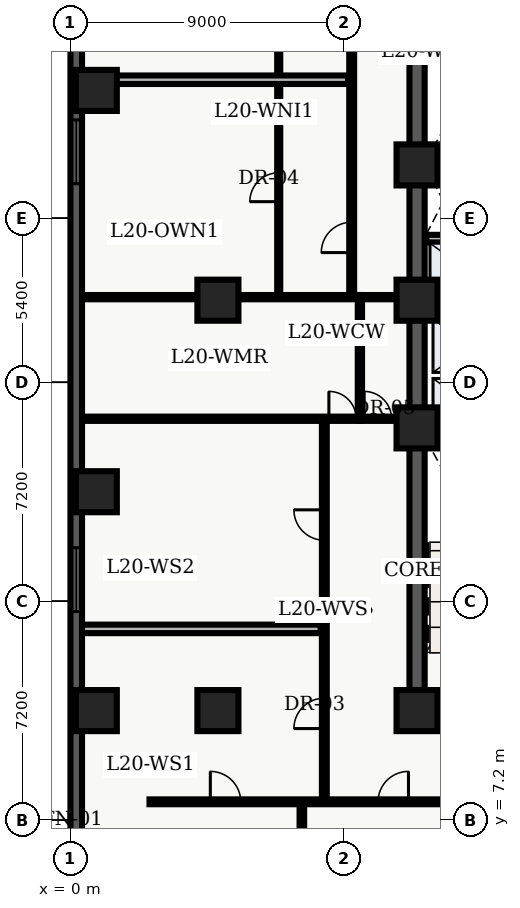
"""IFC4 building model, lengths in metres.
Left out: names, types, materials, properties, quantities, classifications, styles, units other than length and angle.
Written with IfcOpenShell. Run it as: python <this file> out.ifc"""

import sys

from ifc_helpers import new_model, entity, si_unit, converted_unit, direction, frame, origin_with_axes, origin_2d_with_axis, place, context, subcontext, project, spatial, polyline, rectangle, outline, extrude, element, fill, save


model = new_model("IFC4")
c1 = context("Model", 3, precision=1e-05, world=origin_with_axes(), true_north=direction((0.0, 1.0)))
c2 = subcontext(c1, "Body", "Model", "MODEL_VIEW")
j1 = project(units=[si_unit("LENGTHUNIT", "METRE"), converted_unit("PLANEANGLEUNIT", "DEGREE", entity("IfcPlaneAngleMeasure", 0.017), si_unit("PLANEANGLEUNIT", "RADIAN"), dimensions=[0, 0, 0, 0, 0, 0, 0])], contexts=[c1])
p1 = place(None, origin_with_axes())
s1 = spatial("IfcSite", under=j1, at=p1, CompositionType="ELEMENT")
p2 = place(p1, origin_with_axes())
s2 = spatial("IfcBuilding", under=s1, at=p2, CompositionType="ELEMENT")
p3 = place(p2, frame((0.0, 0.0, 84.6), z_axis=(0.0, 0.0, 1.0), x_axis=(1.0, 0.0, 0.0)))
s3 = spatial("IfcBuildingStorey", under=s2, at=p3, CompositionType="ELEMENT", Elevation=84.6)
p4 = place(p3, frame((11.4, 10.8, 0.0), z_axis=(0.0, 0.0, 1.0), x_axis=(0.0, 1.0, 0.0)))
e1 = element("IfcWall", 1, at=p4, inside=s3, PredefinedType="SHEAR", context=c2, shape_type="SweptSolid", body=[
    extrude(outline(polyline([(0.0, -0.25), (27.0, -0.25), (27.0, 0.25), (0.0, 0.25), (0.0, -0.25)])), origin_with_axes(), (0.0, 0.0, 1.0), 4.26),
])
p5 = place(p3, frame((11.4, 10.8, 0.0), z_axis=(0.0, 0.0, 1.0), x_axis=(1.0, 0.0, 0.0)))
e2 = element("IfcWall", 2, at=p5, inside=s3, PredefinedType="SHEAR", context=c2, shape_type="SweptSolid", body=[
    extrude(outline(polyline([(0.0, -0.25), (7.2, -0.25), (7.2, 0.25), (0.0, 0.25), (0.0, -0.25)])), origin_with_axes(), (0.0, 0.0, 1.0), 4.26),
])
p6 = place(p5, frame((2.625, 0.0, 0.0), z_axis=(0.0, 0.0, 1.0), x_axis=(1.0, 0.0, 0.0)))
e3 = element("IfcOpeningElement", 3, at=p6, cuts=e2, PredefinedType="OPENING", context=c2, shape_type="SweptSolid", body=[
    extrude(rectangle(XDim=1.05, YDim=0.52, at=origin_2d_with_axis()), origin_with_axes(), (0.0, 0.0, 1.0), 2.15),
])
for number, where, z_axis, x_axis in (
    (4, (11.65, 19.825, 0.0), (0.0, 0.0, 1.0), (1.0, 0.0, 0.0)),
    (5, (11.65, 28.775, 0.0), (0.0, 0.0, 1.0), (1.0, 0.0, 0.0)),
):
    element("IfcWall", number, at=place(p3, frame(where, z_axis=z_axis, x_axis=x_axis)), inside=s3, PredefinedType="SHEAR", context=c2, shape_type="SweptSolid", body=[
        extrude(outline(polyline([(0.0, -0.125), (6.7, -0.125), (6.7, 0.125), (0.0, 0.125), (0.0, -0.125)])), origin_with_axes(), (0.0, 0.0, 1.0), 4.26),
    ])
p7 = place(p3, frame((11.7, 24.1, 0.0), z_axis=(0.0, 0.0, 1.0), x_axis=(1.0, 0.0, 0.0)))
e6 = element("IfcWall", 6, at=p7, inside=s3, PredefinedType="SOLIDWALL", context=c2, shape_type="SweptSolid", body=[
    extrude(outline(polyline([(0.0, -0.125), (6.6, -0.125), (6.6, 0.125), (0.0, 0.125), (0.0, -0.125)])), origin_with_axes(), (0.0, 0.0, 1.0), 3.3),
])
p8 = place(p7, frame((3.75, 0.0, 0.0), z_axis=(0.0, 0.0, 1.0), x_axis=(1.0, 0.0, 0.0)))
e7 = element("IfcOpeningElement", 7, at=p8, cuts=e6, PredefinedType="OPENING", context=c2, shape_type="SweptSolid", body=[
    extrude(rectangle(XDim=0.9, YDim=0.27, at=origin_2d_with_axis()), origin_with_axes(), (0.0, 0.0, 1.0), 2.15),
])
p9 = place(p3, frame((11.7, 26.325, 0.0), z_axis=(0.0, 0.0, 1.0), x_axis=(1.0, 0.0, 0.0)))
e8 = element("IfcWall", 8, at=p9, inside=s3, PredefinedType="SOLIDWALL", context=c2, shape_type="SweptSolid", body=[
    extrude(outline(polyline([(0.0, -0.125), (6.6, -0.125), (6.6, 0.125), (0.0, 0.125), (0.0, -0.125)])), origin_with_axes(), (0.0, 0.0, 1.0), 3.3),
])
p10 = place(p9, frame((3.5, 0.0, 0.0), z_axis=(0.0, 0.0, 1.0), x_axis=(1.0, 0.0, 0.0)))
e9 = element("IfcOpeningElement", 9, at=p10, cuts=e8, PredefinedType="OPENING", context=c2, shape_type="SweptSolid", body=[
    extrude(rectangle(XDim=0.9, YDim=0.27, at=origin_2d_with_axis()), origin_with_axes(), (0.0, 0.0, 1.0), 2.15),
])
for number, where, z_axis, x_axis in (
    (10, (11.4, 10.8, 0.0), (0.0, 0.0, 1.0), (1.0, 0.0, 0.0)),
    (11, (11.4, 20.1, 0.0), (0.0, 0.0, 1.0), (1.0, 0.0, 0.0)),
    (12, (11.4, 24.3, 0.0), (0.0, 0.0, 1.0), (1.0, 0.0, 0.0)),
    (13, (11.4, 28.75, 0.0), (0.0, 0.0, 1.0), (1.0, 0.0, 0.0)),
    (14, (4.85, 10.8, 0.0), (0.0, 0.0, 1.0), (1.0, 0.0, 0.0)),
    (15, (4.85, 24.3, 0.0), (0.0, 0.0, 1.0), (1.0, 0.0, 0.0)),
    (16, (0.85, 10.8, 0.0), (0.0, 0.0, 1.0), (1.0, 0.0, 0.0)),
    (17, (0.85, 18.0, 0.0), (0.0, 0.0, 1.0), (1.0, 0.0, 0.0)),
    (18, (0.85, 31.2, 0.0), (0.0, 0.0, 1.0), (1.0, 0.0, 0.0)),
):
    element("IfcColumn", number, at=place(p3, frame(where, z_axis=z_axis, x_axis=x_axis)), inside=s3, PredefinedType="COLUMN", context=c2, shape_type="SweptSolid", body=[
        extrude(rectangle(XDim=1.35, YDim=1.35, at=origin_2d_with_axis()), origin_with_axes(), (0.0, 0.0, 1.0), 4.5),
    ])
p11 = place(p3, frame((9.52, 20.4, 0.0), z_axis=(0.0, 0.0, 1.0), x_axis=(0.0, 1.0, 0.0)))
e19 = element("IfcWall", 19, at=p11, inside=s3, PredefinedType="PARTITIONING", context=c2, shape_type="SweptSolid", body=[
    extrude(outline(polyline([(0.0, -0.07), (4.0, -0.07), (4.0, 0.07), (0.0, 0.07), (0.0, -0.07)])), origin_with_axes(), (0.0, 0.0, 1.0), 3.2),
])
p12 = place(p3, frame((9.52, 20.4, 0.0), z_axis=(0.0, 0.0, 1.0), x_axis=(1.0, 0.0, 0.0)))
e20 = element("IfcWall", 20, at=p12, inside=s3, PredefinedType="PARTITIONING", context=c2, shape_type="SweptSolid", body=[
    extrude(outline(polyline([(0.0, -0.07), (1.58, -0.07), (1.58, 0.07), (0.0, 0.07), (0.0, -0.07)])), origin_with_axes(), (0.0, 0.0, 1.0), 3.2),
])
p13 = place(p12, frame((0.59, 0.0, 0.0), z_axis=(0.0, 0.0, 1.0), x_axis=(1.0, 0.0, 0.0)))
e21 = element("IfcOpeningElement", 21, at=p13, cuts=e20, PredefinedType="OPENING", context=c2, shape_type="SweptSolid", body=[
    extrude(rectangle(XDim=0.9, YDim=0.16, at=origin_2d_with_axis()), origin_with_axes(), (0.0, 0.0, 1.0), 2.15),
])
p14 = place(p3, frame((9.52, 24.4, 0.0), z_axis=(0.0, 0.0, 1.0), x_axis=(1.0, 0.0, 0.0)))
e22 = element("IfcWall", 22, at=p14, inside=s3, PredefinedType="PARTITIONING", context=c2, shape_type="SweptSolid", body=[
    extrude(outline(polyline([(0.0, -0.07), (1.58, -0.07), (1.58, 0.07), (0.0, 0.07), (0.0, -0.07)])), origin_with_axes(), (0.0, 0.0, 1.0), 3.2),
])
p15 = place(p3, frame((2.6, 7.8, 0.0), z_axis=(0.0, 0.0, 1.0), x_axis=(1.0, 0.0, 0.0)))
e23 = element("IfcWall", 23, at=p15, inside=s3, PredefinedType="PARTITIONING", context=c2, shape_type="SweptSolid", body=[
    extrude(outline(polyline([(0.0, -0.08), (18.55, -0.08), (18.55, 0.08), (0.0, 0.08), (0.0, -0.08)])), origin_with_axes(), (0.0, 0.0, 1.0), 3.2),
])
p16 = place(p15, frame((2.501, 0.0, 0.0), z_axis=(0.0, 0.0, 1.0), x_axis=(1.0, 0.0, 0.0)))
e24 = element("IfcOpeningElement", 24, at=p16, cuts=e23, PredefinedType="OPENING", context=c2, shape_type="SweptSolid", body=[
    extrude(rectangle(XDim=1.0, YDim=0.18, at=origin_2d_with_axis()), origin_with_axes(), (0.0, 0.0, 1.0), 2.15),
])
p17 = place(p15, frame((8.018, 0.0, 0.0), z_axis=(0.0, 0.0, 1.0), x_axis=(1.0, 0.0, 0.0)))
e25 = element("IfcOpeningElement", 25, at=p17, cuts=e23, PredefinedType="OPENING", context=c2, shape_type="SweptSolid", body=[
    extrude(rectangle(XDim=1.0, YDim=0.18, at=origin_2d_with_axis()), origin_with_axes(), (0.0, 0.0, 1.0), 2.15),
])
p18 = place(p15, frame((14.762, 0.0, 0.0), z_axis=(0.0, 0.0, 1.0), x_axis=(1.0, 0.0, 0.0)))
e26 = element("IfcOpeningElement", 26, at=p18, cuts=e23, PredefinedType="OPENING", context=c2, shape_type="SweptSolid", body=[
    extrude(rectangle(XDim=1.2, YDim=0.18, at=origin_2d_with_axis()), origin_with_axes(), (0.0, 0.0, 1.0), 2.2),
])
p19 = place(p3, frame((8.35, 7.8, 0.0), z_axis=(0.0, 0.0, 1.0), x_axis=(0.0, 1.0, 0.0)))
e27 = element("IfcWall", 27, at=p19, inside=s3, PredefinedType="PARTITIONING", context=c2, shape_type="SweptSolid", body=[
    extrude(outline(polyline([(0.0, -0.08), (12.6, -0.08), (12.6, 0.08), (0.0, 0.08), (0.0, -0.08)])), origin_with_axes(), (0.0, 0.0, 1.0), 3.2),
])
p20 = place(p19, frame((2.909, 0.0, 0.0), z_axis=(0.0, 0.0, 1.0), x_axis=(1.0, 0.0, 0.0)))
e28 = element("IfcOpeningElement", 28, at=p20, cuts=e27, PredefinedType="OPENING", context=c2, shape_type="SweptSolid", body=[
    extrude(rectangle(XDim=1.0, YDim=0.18, at=origin_2d_with_axis()), origin_with_axes(), (0.0, 0.0, 1.0), 2.15),
])
p21 = place(p19, frame((9.104, 0.0, 0.0), z_axis=(0.0, 0.0, 1.0), x_axis=(1.0, 0.0, 0.0)))
e29 = element("IfcOpeningElement", 29, at=p21, cuts=e27, PredefinedType="OPENING", context=c2, shape_type="SweptSolid", body=[
    extrude(rectangle(XDim=1.0, YDim=0.18, at=origin_2d_with_axis()), origin_with_axes(), (0.0, 0.0, 1.0), 2.15),
])
p22 = place(p3, frame((9.25, 24.4, 0.0), z_axis=(0.0, 0.0, 1.0), x_axis=(0.0, 1.0, 0.0)))
e30 = element("IfcWall", 30, at=p22, inside=s3, PredefinedType="PARTITIONING", context=c2, shape_type="SweptSolid", body=[
    extrude(outline(polyline([(0.0, -0.08), (16.1, -0.08), (16.1, 0.08), (0.0, 0.08), (0.0, -0.08)])), origin_with_axes(), (0.0, 0.0, 1.0), 3.2),
])
p23 = place(p22, frame((1.966, 0.0, 0.0), z_axis=(0.0, 0.0, 1.0), x_axis=(1.0, 0.0, 0.0)))
e31 = element("IfcOpeningElement", 31, at=p23, cuts=e30, PredefinedType="OPENING", context=c2, shape_type="SweptSolid", body=[
    extrude(rectangle(XDim=1.0, YDim=0.18, at=origin_2d_with_axis()), origin_with_axes(), (0.0, 0.0, 1.0), 2.15),
])
p24 = place(p22, frame((11.001, 0.0, 0.0), z_axis=(0.0, 0.0, 1.0), x_axis=(1.0, 0.0, 0.0)))
e32 = element("IfcOpeningElement", 32, at=p24, cuts=e30, PredefinedType="OPENING", context=c2, shape_type="SweptSolid", body=[
    extrude(rectangle(XDim=1.0, YDim=0.18, at=origin_2d_with_axis()), origin_with_axes(), (0.0, 0.0, 1.0), 2.15),
])
p25 = place(p3, frame((0.36, 20.4, 0.0), z_axis=(0.0, 0.0, 1.0), x_axis=(1.0, 0.0, 0.0)))
e33 = element("IfcWall", 33, at=p25, inside=s3, PredefinedType="PARTITIONING", context=c2, shape_type="SweptSolid", body=[
    extrude(outline(polyline([(0.0, -0.07), (9.16, -0.07), (9.16, 0.07), (0.0, 0.07), (0.0, -0.07)])), origin_with_axes(), (0.0, 0.0, 1.0), 3.2),
])
p26 = place(p25, frame((8.59, 0.0, 0.0), z_axis=(0.0, 0.0, 1.0), x_axis=(1.0, 0.0, 0.0)))
e34 = element("IfcOpeningElement", 34, at=p26, cuts=e33, PredefinedType="OPENING", context=c2, shape_type="SweptSolid", body=[
    extrude(rectangle(XDim=0.9, YDim=0.16, at=origin_2d_with_axis()), origin_with_axes(), (0.0, 0.0, 1.0), 2.15),
])
p27 = place(p3, frame((0.36, 24.4, 0.0), z_axis=(0.0, 0.0, 1.0), x_axis=(1.0, 0.0, 0.0)))
e35 = element("IfcWall", 35, at=p27, inside=s3, PredefinedType="PARTITIONING", context=c2, shape_type="SweptSolid", body=[
    extrude(outline(polyline([(0.0, -0.07), (9.16, -0.07), (9.16, 0.07), (0.0, 0.07), (0.0, -0.07)])), origin_with_axes(), (0.0, 0.0, 1.0), 3.2),
])
p28 = place(p3, frame((0.375, 13.488, 0.0), z_axis=(0.0, 0.0, 1.0), x_axis=(1.0, 0.0, 0.0)))
e36 = element("IfcWall", 36, at=p28, inside=s3, PredefinedType="PARTITIONING", context=c2, shape_type="SweptSolid", body=[
    extrude(outline(polyline([(0.0, -0.14), (7.855, -0.14), (7.855, 0.14), (0.0, 0.14), (0.0, -0.14)])), origin_with_axes(), (0.0, 0.0, 1.0), 3.2),
])
p29 = place(p3, frame((6.85, 24.55, 0.0), z_axis=(0.0, 0.0, 1.0), x_axis=(0.0, 1.0, 0.0)))
e37 = element("IfcWall", 37, at=p29, inside=s3, PredefinedType="PARTITIONING", context=c2, shape_type="SweptSolid", body=[
    extrude(outline(polyline([(0.0, -0.05), (15.75, -0.05), (15.75, 0.05), (0.0, 0.05), (0.0, -0.05)])), origin_with_axes(), (0.0, 0.0, 1.0), 3.2),
])
p30 = place(p29, frame((3.466, 0.0, 0.0), z_axis=(0.0, 0.0, 1.0), x_axis=(1.0, 0.0, 0.0)))
e38 = element("IfcOpeningElement", 38, at=p30, cuts=e37, PredefinedType="OPENING", context=c2, shape_type="SweptSolid", body=[
    extrude(rectangle(XDim=0.95, YDim=0.12, at=origin_2d_with_axis()), origin_with_axes(), (0.0, 0.0, 1.0), 2.15),
])
p31 = place(p29, frame((10.851, 0.0, 0.0), z_axis=(0.0, 0.0, 1.0), x_axis=(1.0, 0.0, 0.0)))
e39 = element("IfcOpeningElement", 39, at=p31, cuts=e37, PredefinedType="OPENING", context=c2, shape_type="SweptSolid", body=[
    extrude(rectangle(XDim=0.95, YDim=0.12, at=origin_2d_with_axis()), origin_with_axes(), (0.0, 0.0, 1.0), 2.15),
])
p32 = place(p3, frame((0.375, 31.552, 0.0), z_axis=(0.0, 0.0, 1.0), x_axis=(1.0, 0.0, 0.0)))
e40 = element("IfcWall", 40, at=p32, inside=s3, PredefinedType="PARTITIONING", context=c2, shape_type="SweptSolid", body=[
    extrude(outline(polyline([(0.0, -0.14), (8.755, -0.14), (8.755, 0.14), (0.0, 0.14), (0.0, -0.14)])), origin_with_axes(), (0.0, 0.0, 1.0), 3.2),
])
p33 = place(p3, frame((7.611, 0.36, 0.0), z_axis=(0.0, 0.0, 1.0), x_axis=(0.0, 1.0, 0.0)))
e41 = element("IfcWall", 41, at=p33, inside=s3, PredefinedType="PARTITIONING", context=c2, shape_type="SweptSolid", body=[
    extrude(outline(polyline([(0.0, -0.075), (7.34, -0.075), (7.34, 0.075), (0.0, 0.075), (0.0, -0.075)])), origin_with_axes(), (0.0, 0.0, 1.0), 3.2),
])
p34 = place(p3, frame((0.19, 2.78, 0.0), z_axis=(0.0, 0.0, 1.0), x_axis=(0.0, 1.0, 0.0)))
e42 = element("IfcWall", 42, at=p34, inside=s3, PredefinedType="SOLIDWALL", context=c2, shape_type="SweptSolid", body=[
    extrude(outline(polyline([(0.0, -0.19), (43.42, -0.19), (43.42, 0.19), (0.0, 0.19), (0.0, -0.19)])), origin_with_axes(), (0.0, 0.0, 1.0), 4.26),
])
p35 = place(p34, frame((2.946, 0.0, 0.45), z_axis=(0.0, 0.0, 1.0), x_axis=(1.0, 0.0, 0.0)))
e43 = element("IfcOpeningElement", 43, at=p35, cuts=e42, PredefinedType="OPENING", context=c2, shape_type="SweptSolid", body=[
    extrude(rectangle(XDim=2.1, YDim=0.4, at=origin_2d_with_axis()), origin_with_axes(), (0.0, 0.0, 1.0), 2.2),
])
p36 = place(p34, frame((12.328, 0.0, 0.45), z_axis=(0.0, 0.0, 1.0), x_axis=(1.0, 0.0, 0.0)))
e44 = element("IfcOpeningElement", 44, at=p36, cuts=e42, PredefinedType="OPENING", context=c2, shape_type="SweptSolid", body=[
    extrude(rectangle(XDim=2.1, YDim=0.4, at=origin_2d_with_axis()), origin_with_axes(), (0.0, 0.0, 1.0), 2.2),
])
p37 = place(p34, frame((26.401, 0.0, 0.45), z_axis=(0.0, 0.0, 1.0), x_axis=(1.0, 0.0, 0.0)))
e45 = element("IfcOpeningElement", 45, at=p37, cuts=e42, PredefinedType="OPENING", context=c2, shape_type="SweptSolid", body=[
    extrude(rectangle(XDim=2.1, YDim=0.4, at=origin_2d_with_axis()), origin_with_axes(), (0.0, 0.0, 1.0), 2.2),
])
p38 = place(p34, frame((31.092, 0.0, 0.45), z_axis=(0.0, 0.0, 1.0), x_axis=(1.0, 0.0, 0.0)))
e46 = element("IfcOpeningElement", 46, at=p38, cuts=e42, PredefinedType="OPENING", context=c2, shape_type="SweptSolid", body=[
    extrude(rectangle(XDim=2.1, YDim=0.4, at=origin_2d_with_axis()), origin_with_axes(), (0.0, 0.0, 1.0), 2.2),
])
p39 = place(p34, frame((40.024, 0.0, 0.45), z_axis=(0.0, 0.0, 1.0), x_axis=(1.0, 0.0, 0.0)))
e47 = element("IfcOpeningElement", 47, at=p39, cuts=e42, PredefinedType="OPENING", context=c2, shape_type="SweptSolid", body=[
    extrude(rectangle(XDim=2.1, YDim=0.4, at=origin_2d_with_axis()), origin_with_axes(), (0.0, 0.0, 1.0), 2.2),
])
p40 = place(p12, frame((0.59, 0.0, 0.0), z_axis=(0.0, 0.0, 1.0), x_axis=(1.0, 0.0, 0.0)))
e48 = element("IfcDoor", 48, at=p40, inside=s3, OperationType="SINGLE_SWING_LEFT", PredefinedType="DOOR", context=c2, shape_type="SweptSolid", body=[
    extrude(rectangle(XDim=0.9, YDim=0.084, at=origin_2d_with_axis()), origin_with_axes(), (0.0, 0.0, 1.0), 2.15),
])
fill(e21, e48)
p41 = place(p25, frame((8.59, 0.0, 0.0), z_axis=(0.0, 0.0, 1.0), x_axis=(1.0, 0.0, 0.0)))
e49 = element("IfcDoor", 49, at=p41, inside=s3, OperationType="SINGLE_SWING_LEFT", PredefinedType="DOOR", context=c2, shape_type="SweptSolid", body=[
    extrude(rectangle(XDim=0.9, YDim=0.084, at=origin_2d_with_axis()), origin_with_axes(), (0.0, 0.0, 1.0), 2.15),
])
fill(e34, e49)
p42 = place(p19, frame((2.909, 0.0, 0.0), z_axis=(0.0, 0.0, 1.0), x_axis=(1.0, 0.0, 0.0)))
e50 = element("IfcDoor", 50, at=p42, inside=s3, OperationType="SINGLE_SWING_LEFT", PredefinedType="DOOR", context=c2, shape_type="SweptSolid", body=[
    extrude(rectangle(XDim=1.0, YDim=0.09, at=origin_2d_with_axis()), origin_with_axes(), (0.0, 0.0, 1.0), 2.15),
])
fill(e28, e50)
p43 = place(p19, frame((9.104, 0.0, 0.0), z_axis=(0.0, 0.0, 1.0), x_axis=(1.0, 0.0, 0.0)))
e51 = element("IfcDoor", 51, at=p43, inside=s3, OperationType="SINGLE_SWING_RIGHT", PredefinedType="DOOR", context=c2, shape_type="SweptSolid", body=[
    extrude(rectangle(XDim=1.0, YDim=0.09, at=origin_2d_with_axis()), origin_with_axes(), (0.0, 0.0, 1.0), 2.15),
])
fill(e29, e51)
p44 = place(p29, frame((3.466, 0.0, 0.0), z_axis=(0.0, 0.0, 1.0), x_axis=(1.0, 0.0, 0.0)))
e52 = element("IfcDoor", 52, at=p44, inside=s3, OperationType="SINGLE_SWING_LEFT", PredefinedType="DOOR", context=c2, shape_type="SweptSolid", body=[
    extrude(rectangle(XDim=0.95, YDim=0.06, at=origin_2d_with_axis()), origin_with_axes(), (0.0, 0.0, 1.0), 2.15),
])
fill(e38, e52)
p45 = place(p22, frame((1.966, 0.0, 0.0), z_axis=(0.0, 0.0, 1.0), x_axis=(1.0, 0.0, 0.0)))
e53 = element("IfcDoor", 53, at=p45, inside=s3, OperationType="SINGLE_SWING_LEFT", PredefinedType="DOOR", context=c2, shape_type="SweptSolid", body=[
    extrude(rectangle(XDim=1.0, YDim=0.09, at=origin_2d_with_axis()), origin_with_axes(), (0.0, 0.0, 1.0), 2.15),
])
fill(e31, e53)
p46 = place(p15, frame((2.501, 0.0, 0.0), z_axis=(0.0, 0.0, 1.0), x_axis=(1.0, 0.0, 0.0)))
e54 = element("IfcDoor", 54, at=p46, inside=s3, OperationType="SINGLE_SWING_LEFT", PredefinedType="DOOR", context=c2, shape_type="SweptSolid", body=[
    extrude(rectangle(XDim=1.0, YDim=0.09, at=origin_2d_with_axis()), origin_with_axes(), (0.0, 0.0, 1.0), 2.15),
])
fill(e24, e54)
p47 = place(p15, frame((8.018, 0.0, 0.0), z_axis=(0.0, 0.0, 1.0), x_axis=(1.0, 0.0, 0.0)))
e55 = element("IfcDoor", 55, at=p47, inside=s3, OperationType="SINGLE_SWING_RIGHT", PredefinedType="DOOR", context=c2, shape_type="SweptSolid", body=[
    extrude(rectangle(XDim=1.0, YDim=0.09, at=origin_2d_with_axis()), origin_with_axes(), (0.0, 0.0, 1.0), 2.15),
])
fill(e25, e55)
p48 = place(p34, frame((12.328, 0.0, 0.45), z_axis=(0.0, 0.0, 1.0), x_axis=(1.0, 0.0, 0.0)))
e56 = element("IfcWindow", 56, at=p48, inside=s3, PredefinedType="WINDOW", context=c2, shape_type="SweptSolid", body=[
    extrude(rectangle(XDim=2.1, YDim=0.09, at=origin_2d_with_axis()), origin_with_axes(), (0.0, 0.0, 1.0), 2.2),
])
fill(e44, e56)
p49 = place(p34, frame((26.401, 0.0, 0.45), z_axis=(0.0, 0.0, 1.0), x_axis=(1.0, 0.0, 0.0)))
e57 = element("IfcWindow", 57, at=p49, inside=s3, PredefinedType="WINDOW", context=c2, shape_type="SweptSolid", body=[
    extrude(rectangle(XDim=2.1, YDim=0.09, at=origin_2d_with_axis()), origin_with_axes(), (0.0, 0.0, 1.0), 2.2),
])
fill(e45, e57)
save(model, sys.argv[1])
